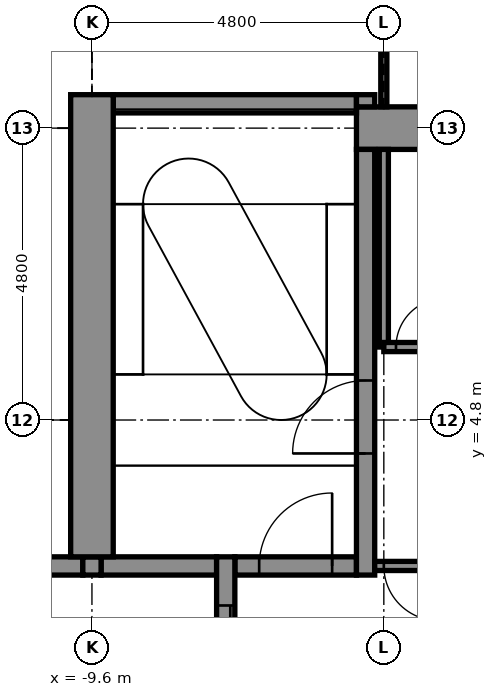
"""IFC4 building model, lengths in metres.
Left out: names, types, materials, properties, quantities, classifications, styles, units other than length and angle.
Written with IfcOpenShell. Run it as: python <this file> out.ifc"""

import sys

from ifc_helpers import new_model, si_unit, direction, frame, frame_2d, origin, place, context, subcontext, project, spatial, rectangle, extrude, element, fill, save


model = new_model("IFC4")
c1 = context("Model", 3, precision=1e-05, world=origin(), true_north=direction((0.0, 1.0)))
c2 = subcontext(c1, "Body", "Model", "MODEL_VIEW")
j1 = project(units=[si_unit("LENGTHUNIT", "METRE"), si_unit("PLANEANGLEUNIT", "RADIAN")], contexts=[c1])
p1 = place(None, origin())
s1 = spatial("IfcSite", under=j1, at=p1, CompositionType="ELEMENT")
p2 = place(p1, origin())
s2 = spatial("IfcBuilding", under=s1, at=p2, CompositionType="ELEMENT")
p3 = place(p2, frame((0.0, 0.0, 150.5)))
s3 = spatial("IfcBuildingStorey", under=s2, at=p3, CompositionType="ELEMENT", Elevation=150.5)
p4 = place(p3, frame((-10.85, 2.4, -0.15), z_axis=(0.0, 0.0, 1.0), x_axis=(1.0, 0.0, 0.0)))
e1 = element("IfcWall", 1, at=p4, inside=s3, PredefinedType="STANDARD", context=c2, shape_type="SweptSolid", body=[
    extrude(rectangle(XDim=1.1, YDim=0.3, at=frame_2d((0.55, 0.0))), origin(), (0.0, 0.0, 1.0), 3.9),
])
p5 = place(p3, frame((-9.45, 2.4, -0.15), z_axis=(0.0, 0.0, 1.0), x_axis=(1.0, 0.0, 0.0)))
e2 = element("IfcWall", 2, at=p5, inside=s3, PredefinedType="STANDARD", context=c2, shape_type="SweptSolid", body=[
    extrude(rectangle(XDim=1.9, YDim=0.3, at=frame_2d((0.95, 0.0))), origin(), (0.0, 0.0, 1.0), 3.9),
])
p6 = place(p3, frame((-7.25, 2.4, -0.15), z_axis=(0.0, 0.0, 1.0), x_axis=(1.0, 0.0, 0.0)))
e3 = element("IfcWall", 3, at=p6, inside=s3, PredefinedType="STANDARD", context=c2, shape_type="SweptSolid", body=[
    extrude(rectangle(XDim=2.0, YDim=0.3, at=frame_2d((1.0, 0.0))), origin(), (0.0, 0.0, 1.0), 3.9),
])
p7 = place(p6, frame((0.4, 0.0, 0.15)))
e4 = element("IfcOpeningElement", 4, at=p7, cuts=e3, PredefinedType="OPENING", context=c2, shape_type="SweptSolid", body=[
    extrude(rectangle(XDim=1.2, YDim=2.1, at=frame_2d((0.6, 1.05))), frame((0.0, 0.16, 0.0), z_axis=(0.0, -1.0, 0.0), x_axis=(1.0, 0.0, 0.0)), (0.0, 0.0, 1.0), 0.32),
])
p8 = place(p3, frame((-5.25, 9.6, -0.15), z_axis=(0.0, 0.0, 1.0), x_axis=(1.0, 0.0, 0.0)))
e5 = element("IfcWall", 5, at=p8, inside=s3, PredefinedType="SHEAR", context=c2, shape_type="SweptSolid", body=[
    extrude(rectangle(XDim=14.5, YDim=0.7, at=frame_2d((7.25, 0.0))), origin(), (0.0, 0.0, 1.0), 3.9),
])
p9 = place(p8, frame((9.35, 0.0, 0.15)))
e6 = element("IfcOpeningElement", 6, at=p9, cuts=e5, PredefinedType="OPENING", context=c2, shape_type="SweptSolid", body=[
    extrude(rectangle(XDim=1.4, YDim=2.1, at=frame_2d((0.7, 1.05))), frame((0.0, 0.36, 0.0), z_axis=(0.0, -1.0, 0.0), x_axis=(1.0, 0.0, 0.0)), (0.0, 0.0, 1.0), 0.72),
])
p10 = place(p3, frame((-9.25, 10.0, -0.15), z_axis=(0.0, 0.0, 1.0), x_axis=(1.0, 0.0, 0.0)))
e7 = element("IfcWall", 7, at=p10, inside=s3, PredefinedType="STANDARD", context=c2, shape_type="SweptSolid", body=[
    extrude(rectangle(XDim=4.0, YDim=0.3, at=frame_2d((2.0, 0.0))), origin(), (0.0, 0.0, 1.0), 3.9),
])
p11 = place(p3, frame((-9.6, 2.25, -0.15), z_axis=(0.0, 0.0, 1.0), x_axis=(0.0, 1.0, 0.0)))
e8 = element("IfcWall", 8, at=p11, inside=s3, PredefinedType="STANDARD", context=c2, shape_type="SweptSolid", body=[
    extrude(rectangle(XDim=0.3, YDim=0.3, at=frame_2d((0.15, 0.0))), origin(), (0.0, 0.0, 1.0), 3.9),
])
p12 = place(p3, frame((-9.6, 2.55, -0.15), z_axis=(0.0, 0.0, 1.0), x_axis=(0.0, 1.0, 0.0)))
e9 = element("IfcWall", 9, at=p12, inside=s3, PredefinedType="SHEAR", context=c2, shape_type="SweptSolid", body=[
    extrude(rectangle(XDim=7.6, YDim=0.7, at=frame_2d((3.8, 0.0))), origin(), (0.0, 0.0, 1.0), 3.9),
])
p13 = place(p3, frame((-7.4, -2.55, -0.15), z_axis=(0.0, 0.0, 1.0), x_axis=(0.0, 1.0, 0.0)))
e10 = element("IfcWall", 10, at=p13, inside=s3, PredefinedType="STANDARD", context=c2, shape_type="SweptSolid", body=[
    extrude(rectangle(XDim=5.1, YDim=0.3, at=frame_2d((2.55, 0.0))), origin(), (0.0, 0.0, 1.0), 3.9),
])
p14 = place(p13, frame((0.8, 0.0, 0.15)))
e11 = element("IfcOpeningElement", 11, at=p14, cuts=e10, PredefinedType="OPENING", context=c2, shape_type="SweptSolid", body=[
    extrude(rectangle(XDim=1.1, YDim=2.1, at=frame_2d((0.55, 1.05))), frame((0.0, 0.16, 0.0), z_axis=(0.0, -1.0, 0.0), x_axis=(1.0, 0.0, 0.0)), (0.0, 0.0, 1.0), 0.32),
])
p15 = place(p13, frame((3.2, 0.0, 0.15)))
e12 = element("IfcOpeningElement", 12, at=p15, cuts=e10, PredefinedType="OPENING", context=c2, shape_type="SweptSolid", body=[
    extrude(rectangle(XDim=1.1, YDim=2.1, at=frame_2d((0.55, 1.05))), frame((0.0, 0.16, 0.0), z_axis=(0.0, -1.0, 0.0), x_axis=(1.0, 0.0, 0.0)), (0.0, 0.0, 1.0), 0.32),
])
p16 = place(p3, frame((-5.1, 2.25, -0.15), z_axis=(0.0, 0.0, 1.0), x_axis=(0.0, 1.0, 0.0)))
e13 = element("IfcWall", 13, at=p16, inside=s3, PredefinedType="STANDARD", context=c2, shape_type="SweptSolid", body=[
    extrude(rectangle(XDim=7.0, YDim=0.3, at=frame_2d((3.5, 0.0))), origin(), (0.0, 0.0, 1.0), 3.9),
])
p17 = place(p16, frame((2.0, 0.0, 0.15)))
e14 = element("IfcOpeningElement", 14, at=p17, cuts=e13, PredefinedType="OPENING", context=c2, shape_type="SweptSolid", body=[
    extrude(rectangle(XDim=1.2, YDim=2.1, at=frame_2d((0.6, 1.05))), frame((0.0, 0.16, 0.0), z_axis=(0.0, -1.0, 0.0), x_axis=(1.0, 0.0, 0.0)), (0.0, 0.0, 1.0), 0.32),
])
p18 = place(p3, frame((-5.1, 9.95, -0.15), z_axis=(0.0, 0.0, 1.0), x_axis=(0.0, 1.0, 0.0)))
e15 = element("IfcWall", 15, at=p18, inside=s3, PredefinedType="STANDARD", context=c2, shape_type="SweptSolid", body=[
    extrude(rectangle(XDim=0.2, YDim=0.3, at=frame_2d((0.1, 0.0))), origin(), (0.0, 0.0, 1.0), 3.9),
])
p19 = place(p3, frame((-4.8, 9.95, 0.0), z_axis=(0.0, 0.0, 1.0), x_axis=(0.0, 1.0, 0.0)))
e16 = element("IfcWall", 16, at=p19, inside=s3, PredefinedType="PARTITIONING", context=c2, shape_type="SweptSolid", body=[
    extrude(rectangle(XDim=4.85, YDim=0.1, at=frame_2d((2.425, 0.0))), origin(), (0.0, 0.0, 1.0), 3.066),
])
p20 = place(p3, frame((-4.8, 6.0, 0.0), z_axis=(0.0, 0.0, 1.0), x_axis=(0.0, 1.0, 0.0)))
e17 = element("IfcWall", 17, at=p20, inside=s3, PredefinedType="PARTITIONING", context=c2, shape_type="SweptSolid", body=[
    extrude(rectangle(XDim=3.25, YDim=0.15, at=frame_2d((1.625, 0.0))), origin(), (0.0, 0.0, 1.0), 3.75),
])
p21 = place(p3, frame((-4.8, 6.0, 0.0), z_axis=(0.0, 0.0, 1.0), x_axis=(1.0, 0.0, 0.0)))
e18 = element("IfcWall", 18, at=p21, inside=s3, PredefinedType="PARTITIONING", context=c2, shape_type="SweptSolid", body=[
    extrude(rectangle(XDim=1.05, YDim=0.15, at=frame_2d((0.525, 0.0))), origin(), (0.0, 0.0, 1.0), 3.75),
])
p22 = place(p21, frame((0.2, 0.0, 0.0)))
e19 = element("IfcOpeningElement", 19, at=p22, cuts=e18, PredefinedType="OPENING", context=c2, shape_type="SweptSolid", body=[
    extrude(rectangle(XDim=0.8, YDim=2.1, at=frame_2d((0.4, 1.05))), frame((0.0, 0.085, 0.0), z_axis=(0.0, -1.0, 0.0), x_axis=(1.0, 0.0, 0.0)), (0.0, 0.0, 1.0), 0.17),
])
p23 = place(p3, frame((-4.95, 2.4, 0.0), z_axis=(0.0, 0.0, 1.0), x_axis=(1.0, 0.0, 0.0)))
e20 = element("IfcWall", 20, at=p23, inside=s3, PredefinedType="PARTITIONING", context=c2, shape_type="SweptSolid", body=[
    extrude(rectangle(XDim=1.2, YDim=0.15, at=frame_2d((0.6, 0.0))), origin(), (0.0, 0.0, 1.0), 3.75),
])
p24 = place(p23, frame((0.15, 0.0, 0.0)))
e21 = element("IfcOpeningElement", 21, at=p24, cuts=e20, PredefinedType="OPENING", context=c2, shape_type="SweptSolid", body=[
    extrude(rectangle(XDim=0.9, YDim=2.1, at=frame_2d((0.45, 1.05))), frame((0.0, 0.085, 0.0), z_axis=(0.0, -1.0, 0.0), x_axis=(1.0, 0.0, 0.0)), (0.0, 0.0, 1.0), 0.17),
])
p25 = place(p22, origin())
e22 = element("IfcDoor", 22, at=p25, inside=s3, OperationType="SINGLE_SWING_RIGHT", PredefinedType="DOOR", context=c2, shape_type="SweptSolid", body=[
    extrude(rectangle(XDim=0.8, YDim=2.1, at=frame_2d((0.4, 1.05))), frame((0.0, 0.025, 0.0), z_axis=(0.0, -1.0, 0.0), x_axis=(1.0, 0.0, 0.0)), (0.0, 0.0, 1.0), 0.05),
])
fill(e19, e22)
p26 = place(p15, origin())
e23 = element("IfcDoor", 23, at=p26, inside=s3, OperationType="DOUBLE_DOOR_SLIDING", PredefinedType="DOOR", context=c2, shape_type="SweptSolid", body=[
    extrude(rectangle(XDim=1.1, YDim=2.1, at=frame_2d((0.55, 1.05))), frame((0.0, 0.025, 0.0), z_axis=(0.0, -1.0, 0.0), x_axis=(1.0, 0.0, 0.0)), (0.0, 0.0, 1.0), 0.05),
])
fill(e12, e23)
p27 = place(p17, origin())
e24 = element("IfcDoor", 24, at=p27, inside=s3, OperationType="SINGLE_SWING_LEFT", PredefinedType="DOOR", context=c2, shape_type="SweptSolid", body=[
    extrude(rectangle(XDim=1.2, YDim=2.1, at=frame_2d((0.6, 1.05))), frame((0.0, 0.025, 0.0), z_axis=(0.0, -1.0, 0.0), x_axis=(1.0, 0.0, 0.0)), (0.0, 0.0, 1.0), 0.05),
])
fill(e14, e24)
p28 = place(p24, frame((0.9, 0.0, 0.0), z_axis=(0.0, 0.0, 1.0), x_axis=(-1.0, 0.0, 0.0)))
e25 = element("IfcDoor", 25, at=p28, inside=s3, OperationType="SINGLE_SWING_RIGHT", PredefinedType="DOOR", context=c2, shape_type="SweptSolid", body=[
    extrude(rectangle(XDim=0.9, YDim=2.1, at=frame_2d((0.45, 1.05))), frame((0.0, 0.025, 0.0), z_axis=(0.0, -1.0, 0.0), x_axis=(1.0, 0.0, 0.0)), (0.0, 0.0, 1.0), 0.05),
])
fill(e21, e25)
p29 = place(p7, origin())
e26 = element("IfcDoor", 26, at=p29, inside=s3, OperationType="SINGLE_SWING_RIGHT", PredefinedType="DOOR", context=c2, shape_type="SweptSolid", body=[
    extrude(rectangle(XDim=1.2, YDim=2.1, at=frame_2d((0.6, 1.05))), frame((0.0, 0.025, 0.0), z_axis=(0.0, -1.0, 0.0), x_axis=(1.0, 0.0, 0.0)), (0.0, 0.0, 1.0), 0.05),
])
fill(e4, e26)
save(model, sys.argv[1])
